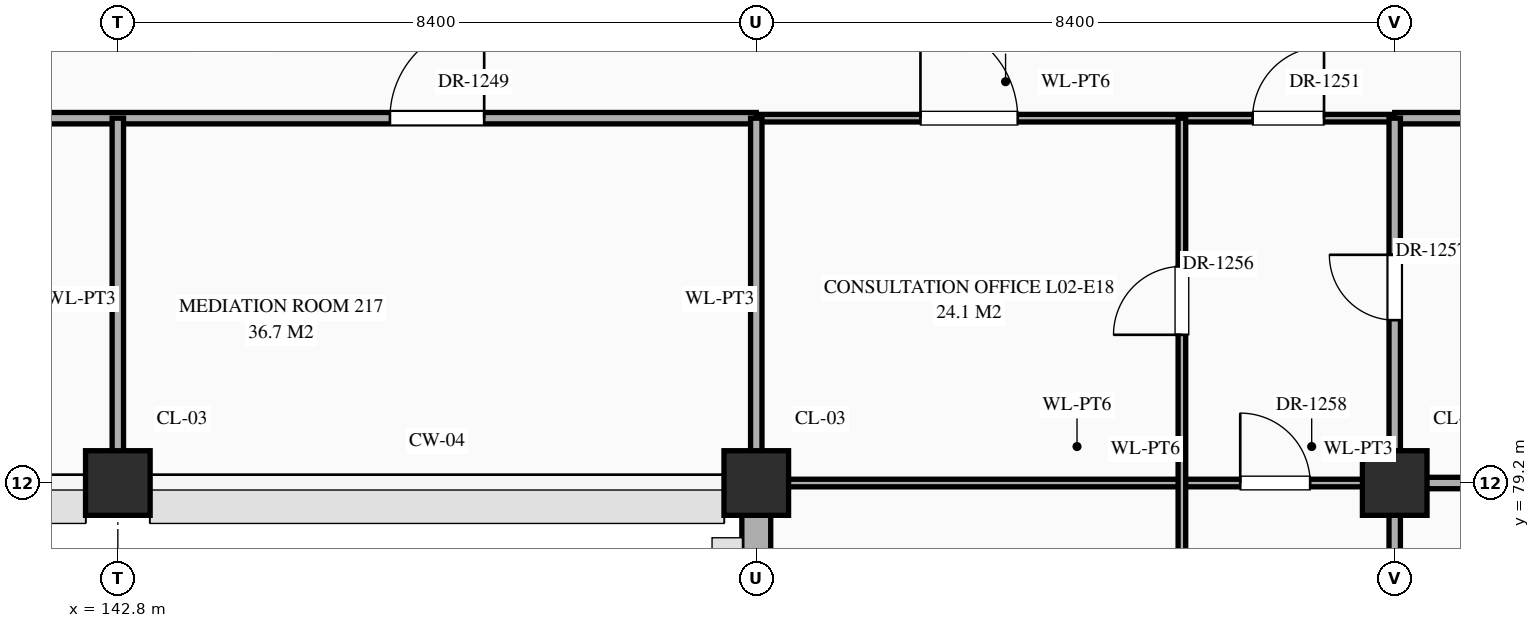
"""IFC4 building model, lengths in metres.
Left out: names, types, materials, properties, quantities, classifications, styles, units other than length and angle.
Written with IfcOpenShell. Run it as: python <this file> out.ifc"""

import sys

from ifc_helpers import new_model, si_unit, direction, frame, frame_2d, origin, origin_2d, place, context, subcontext, project, spatial, rectangle, extrude, element, fill, save


model = new_model("IFC4")
c1 = context("Model", 3, precision=1e-05, world=origin(), true_north=direction((0.0, 1.0)))
c2 = subcontext(c1, "Body", "Model", "MODEL_VIEW")
j1 = project(units=[si_unit("LENGTHUNIT", "METRE"), si_unit("PLANEANGLEUNIT", "RADIAN")], contexts=[c1])
p1 = place(None, origin())
s1 = spatial("IfcSite", under=j1, at=p1, CompositionType="ELEMENT")
p2 = place(p1, origin())
s2 = spatial("IfcBuilding", under=s1, at=p2, CompositionType="ELEMENT")
p3 = place(p2, frame((0.0, 0.0, 5.4)))
s3 = spatial("IfcBuildingStorey", under=s2, at=p3, CompositionType="ELEMENT", Elevation=5.4)
for number, where, z_axis, x_axis in (
    (1, (142.8, 79.2, 0.0), (0.0, 0.0, 1.0), (1.0, 0.0, 0.0)),
    (2, (151.2, 79.2, 0.0), (0.0, 0.0, 1.0), (1.0, 0.0, 0.0)),
    (3, (159.6, 79.2, 0.0), (0.0, 0.0, 1.0), (1.0, 0.0, 0.0)),
):
    element("IfcColumn", number, at=place(p3, frame(where, z_axis=z_axis, x_axis=x_axis)), inside=s3, PredefinedType="COLUMN", context=c2, shape_type="SweptSolid", body=[
        extrude(rectangle(XDim=0.85, YDim=0.85, at=origin_2d()), origin(), (0.0, 0.0, 1.0), 5.4),
    ])
p4 = place(p3, frame((151.2, 72.42, 0.0), z_axis=(0.0, 0.0, 1.0), x_axis=(0.0, 1.0, 0.0)))
e4 = element("IfcWall", 4, at=p4, inside=s3, PredefinedType="STANDARD", context=c2, shape_type="SweptSolid", body=[
    extrude(rectangle(XDim=6.36, YDim=0.38, at=frame_2d((3.18, 0.0))), origin(), (0.0, 0.0, 1.0), 4.47),
])
p5 = place(p4, frame((2.73, 0.0, 0.85)))
e5 = element("IfcOpeningElement", 5, at=p5, cuts=e4, PredefinedType="OPENING", context=c2, shape_type="SweptSolid", body=[
    extrude(rectangle(XDim=0.9, YDim=1.2, at=frame_2d((0.45, 0.6))), frame((0.0, 0.202, 0.0), z_axis=(0.0, -1.0, 0.0), x_axis=(1.0, 0.0, 0.0)), (0.0, 0.0, 1.0), 0.404),
])
p6 = place(p3, frame((151.24, 79.2, 0.0), z_axis=(0.0, 0.0, 1.0), x_axis=(1.0, 0.0, 0.0)))
e6 = element("IfcWall", 6, at=p6, inside=s3, PredefinedType="STANDARD", context=c2, shape_type="SweptSolid", body=[
    extrude(rectangle(XDim=8.36, YDim=0.1, at=frame_2d((4.18, 0.0))), origin(), (0.0, 0.0, 1.0), 4.27),
])
p7 = place(p6, frame((6.327, 0.0, 0.0)))
e7 = element("IfcOpeningElement", 7, at=p7, cuts=e6, PredefinedType="OPENING", context=c2, shape_type="SweptSolid", body=[
    extrude(rectangle(XDim=0.92, YDim=2.15, at=frame_2d((0.46, 1.075))), frame((0.0, 0.062, 0.0), z_axis=(0.0, -1.0, 0.0), x_axis=(1.0, 0.0, 0.0)), (0.0, 0.0, 1.0), 0.124),
])
p8 = place(p3, frame((159.6, 79.2, 0.0), z_axis=(0.0, 0.0, 1.0), x_axis=(1.0, 0.0, 0.0)))
e8 = element("IfcWall", 8, at=p8, inside=s3, PredefinedType="STANDARD", context=c2, shape_type="SweptSolid", body=[
    extrude(rectangle(XDim=8.36, YDim=0.15, at=frame_2d((4.18, 0.0))), origin(), (0.0, 0.0, 1.0), 4.27),
])
p9 = place(p3, frame((16.8, 84.0, 0.0), z_axis=(0.0, 0.0, 1.0), x_axis=(1.0, 0.0, 0.0)))
e9 = element("IfcWall", 9, at=p9, inside=s3, PredefinedType="STANDARD", context=c2, shape_type="SweptSolid", body=[
    extrude(rectangle(XDim=134.4, YDim=0.15, at=frame_2d((67.2, 0.0))), origin(), (0.0, 0.0, 1.0), 5.12),
])
p10 = place(p9, frame((3.58, 0.0, 0.0)))
e10 = element("IfcOpeningElement", 10, at=p10, cuts=e9, PredefinedType="OPENING", context=c2, shape_type="SweptSolid", body=[
    extrude(rectangle(XDim=1.24, YDim=2.3, at=frame_2d((0.62, 1.15))), frame((0.0, 0.087, 0.0), z_axis=(0.0, -1.0, 0.0), x_axis=(1.0, 0.0, 0.0)), (0.0, 0.0, 1.0), 0.174),
])
p11 = place(p9, frame((11.96, 0.0, 0.0)))
e11 = element("IfcOpeningElement", 11, at=p11, cuts=e9, PredefinedType="OPENING", context=c2, shape_type="SweptSolid", body=[
    extrude(rectangle(XDim=1.28, YDim=2.35, at=frame_2d((0.64, 1.175))), frame((0.0, 0.087, 0.0), z_axis=(0.0, -1.0, 0.0), x_axis=(1.0, 0.0, 0.0)), (0.0, 0.0, 1.0), 0.174),
])
p12 = place(p9, frame((20.53, 0.0, 0.0)))
e12 = element("IfcOpeningElement", 12, at=p12, cuts=e9, PredefinedType="OPENING", context=c2, shape_type="SweptSolid", body=[
    extrude(rectangle(XDim=0.94, YDim=2.3, at=frame_2d((0.47, 1.15))), frame((0.0, 0.087, 0.0), z_axis=(0.0, -1.0, 0.0), x_axis=(1.0, 0.0, 0.0)), (0.0, 0.0, 1.0), 0.174),
])
p13 = place(p9, frame((28.91, 0.0, 0.0)))
e13 = element("IfcOpeningElement", 13, at=p13, cuts=e9, PredefinedType="OPENING", context=c2, shape_type="SweptSolid", body=[
    extrude(rectangle(XDim=0.98, YDim=2.35, at=frame_2d((0.49, 1.175))), frame((0.0, 0.087, 0.0), z_axis=(0.0, -1.0, 0.0), x_axis=(1.0, 0.0, 0.0)), (0.0, 0.0, 1.0), 0.174),
])
p14 = place(p9, frame((37.27, 0.0, 0.0)))
e14 = element("IfcOpeningElement", 14, at=p14, cuts=e9, PredefinedType="OPENING", context=c2, shape_type="SweptSolid", body=[
    extrude(rectangle(XDim=1.06, YDim=2.4, at=frame_2d((0.53, 1.2))), frame((0.0, 0.087, 0.0), z_axis=(0.0, -1.0, 0.0), x_axis=(1.0, 0.0, 0.0)), (0.0, 0.0, 1.0), 0.174),
])
p15 = place(p9, frame((45.63, 0.0, 0.0)))
e15 = element("IfcOpeningElement", 15, at=p15, cuts=e9, PredefinedType="OPENING", context=c2, shape_type="SweptSolid", body=[
    extrude(rectangle(XDim=1.14, YDim=2.4, at=frame_2d((0.57, 1.2))), frame((0.0, 0.087, 0.0), z_axis=(0.0, -1.0, 0.0), x_axis=(1.0, 0.0, 0.0)), (0.0, 0.0, 1.0), 0.174),
])
p16 = place(p9, frame((54.15, 0.0, 0.0)))
e16 = element("IfcOpeningElement", 16, at=p16, cuts=e9, PredefinedType="OPENING", context=c2, shape_type="SweptSolid", body=[
    extrude(rectangle(XDim=0.9, YDim=2.15, at=frame_2d((0.45, 1.075))), frame((0.0, 0.087, 0.0), z_axis=(0.0, -1.0, 0.0), x_axis=(1.0, 0.0, 0.0)), (0.0, 0.0, 1.0), 0.174),
])
p17 = place(p9, frame((62.57, 0.0, 0.0)))
e17 = element("IfcOpeningElement", 17, at=p17, cuts=e9, PredefinedType="OPENING", context=c2, shape_type="SweptSolid", body=[
    extrude(rectangle(XDim=0.86, YDim=2.1, at=frame_2d((0.43, 1.05))), frame((0.0, 0.087, 0.0), z_axis=(0.0, -1.0, 0.0), x_axis=(1.0, 0.0, 0.0)), (0.0, 0.0, 1.0), 0.174),
])
p18 = place(p9, frame((70.92, 0.0, 0.0)))
e18 = element("IfcOpeningElement", 18, at=p18, cuts=e9, PredefinedType="OPENING", context=c2, shape_type="SweptSolid", body=[
    extrude(rectangle(XDim=0.96, YDim=2.2, at=frame_2d((0.48, 1.1))), frame((0.0, 0.087, 0.0), z_axis=(0.0, -1.0, 0.0), x_axis=(1.0, 0.0, 0.0)), (0.0, 0.0, 1.0), 0.174),
])
p19 = place(p9, frame((79.3, 0.0, 0.0)))
e19 = element("IfcOpeningElement", 19, at=p19, cuts=e9, PredefinedType="OPENING", context=c2, shape_type="SweptSolid", body=[
    extrude(rectangle(XDim=1.0, YDim=2.25, at=frame_2d((0.5, 1.125))), frame((0.0, 0.087, 0.0), z_axis=(0.0, -1.0, 0.0), x_axis=(1.0, 0.0, 0.0)), (0.0, 0.0, 1.0), 0.174),
])
p20 = place(p9, frame((87.68, 0.0, 0.0)))
e20 = element("IfcOpeningElement", 20, at=p20, cuts=e9, PredefinedType="OPENING", context=c2, shape_type="SweptSolid", body=[
    extrude(rectangle(XDim=1.04, YDim=2.2, at=frame_2d((0.52, 1.1))), frame((0.0, 0.087, 0.0), z_axis=(0.0, -1.0, 0.0), x_axis=(1.0, 0.0, 0.0)), (0.0, 0.0, 1.0), 0.174),
])
p21 = place(p9, frame((96.06, 0.0, 0.0)))
e21 = element("IfcOpeningElement", 21, at=p21, cuts=e9, PredefinedType="OPENING", context=c2, shape_type="SweptSolid", body=[
    extrude(rectangle(XDim=1.08, YDim=2.25, at=frame_2d((0.54, 1.125))), frame((0.0, 0.087, 0.0), z_axis=(0.0, -1.0, 0.0), x_axis=(1.0, 0.0, 0.0)), (0.0, 0.0, 1.0), 0.174),
])
p22 = place(p9, frame((104.44, 0.0, 0.0)))
e22 = element("IfcOpeningElement", 22, at=p22, cuts=e9, PredefinedType="OPENING", context=c2, shape_type="SweptSolid", body=[
    extrude(rectangle(XDim=1.12, YDim=2.25, at=frame_2d((0.56, 1.125))), frame((0.0, 0.087, 0.0), z_axis=(0.0, -1.0, 0.0), x_axis=(1.0, 0.0, 0.0)), (0.0, 0.0, 1.0), 0.174),
])
p23 = place(p9, frame((112.82, 0.0, 0.0)))
e23 = element("IfcOpeningElement", 23, at=p23, cuts=e9, PredefinedType="OPENING", context=c2, shape_type="SweptSolid", body=[
    extrude(rectangle(XDim=1.16, YDim=2.3, at=frame_2d((0.58, 1.15))), frame((0.0, 0.087, 0.0), z_axis=(0.0, -1.0, 0.0), x_axis=(1.0, 0.0, 0.0)), (0.0, 0.0, 1.0), 0.174),
])
p24 = place(p9, frame((121.2, 0.0, 0.0)))
e24 = element("IfcOpeningElement", 24, at=p24, cuts=e9, PredefinedType="OPENING", context=c2, shape_type="SweptSolid", body=[
    extrude(rectangle(XDim=1.2, YDim=2.35, at=frame_2d((0.6, 1.175))), frame((0.0, 0.087, 0.0), z_axis=(0.0, -1.0, 0.0), x_axis=(1.0, 0.0, 0.0)), (0.0, 0.0, 1.0), 0.174),
])
p25 = place(p9, frame((129.58, 0.0, 0.0)))
e25 = element("IfcOpeningElement", 25, at=p25, cuts=e9, PredefinedType="OPENING", context=c2, shape_type="SweptSolid", body=[
    extrude(rectangle(XDim=1.24, YDim=2.3, at=frame_2d((0.62, 1.15))), frame((0.0, 0.087, 0.0), z_axis=(0.0, -1.0, 0.0), x_axis=(1.0, 0.0, 0.0)), (0.0, 0.0, 1.0), 0.174),
])
p26 = place(p3, frame((151.2, 84.0, 0.0), z_axis=(0.0, 0.0, 1.0), x_axis=(1.0, 0.0, 0.0)))
e26 = element("IfcWall", 26, at=p26, inside=s3, PredefinedType="STANDARD", context=c2, shape_type="SweptSolid", body=[
    extrude(rectangle(XDim=8.4, YDim=0.1, at=frame_2d((4.2, 0.0))), origin(), (0.0, 0.0, 1.0), 5.12),
])
p27 = place(p26, frame((2.16, 0.0, 0.0)))
e27 = element("IfcOpeningElement", 27, at=p27, cuts=e26, PredefinedType="OPENING", context=c2, shape_type="SweptSolid", body=[
    extrude(rectangle(XDim=1.28, YDim=2.35, at=frame_2d((0.64, 1.175))), frame((0.0, 0.062, 0.0), z_axis=(0.0, -1.0, 0.0), x_axis=(1.0, 0.0, 0.0)), (0.0, 0.0, 1.0), 0.124),
])
p28 = place(p26, frame((6.53, 0.0, 0.0)))
e28 = element("IfcOpeningElement", 28, at=p28, cuts=e26, PredefinedType="OPENING", context=c2, shape_type="SweptSolid", body=[
    extrude(rectangle(XDim=0.94, YDim=2.3, at=frame_2d((0.47, 1.15))), frame((0.0, 0.062, 0.0), z_axis=(0.0, -1.0, 0.0), x_axis=(1.0, 0.0, 0.0)), (0.0, 0.0, 1.0), 0.124),
])
p29 = place(p3, frame((159.6, 84.0, 0.0), z_axis=(0.0, 0.0, 1.0), x_axis=(1.0, 0.0, 0.0)))
e29 = element("IfcWall", 29, at=p29, inside=s3, PredefinedType="STANDARD", context=c2, shape_type="SweptSolid", body=[
    extrude(rectangle(XDim=8.36, YDim=0.15, at=frame_2d((4.18, 0.0))), origin(), (0.0, 0.0, 1.0), 5.12),
])
p30 = place(p29, frame((3.69, 0.0, 0.0)))
e30 = element("IfcOpeningElement", 30, at=p30, cuts=e29, PredefinedType="OPENING", context=c2, shape_type="SweptSolid", body=[
    extrude(rectangle(XDim=0.98, YDim=2.35, at=frame_2d((0.49, 1.175))), frame((0.0, 0.087, 0.0), z_axis=(0.0, -1.0, 0.0), x_axis=(1.0, 0.0, 0.0)), (0.0, 0.0, 1.0), 0.174),
])
for number, where, z_axis, x_axis in (
    (31, (142.8, 79.24, 0.0), (0.0, 0.0, 1.0), (0.0, 1.0, 0.0)),
    (32, (151.2, 79.24, 0.0), (0.0, 0.0, 1.0), (0.0, 1.0, 0.0)),
):
    element("IfcWall", number, at=place(p3, frame(where, z_axis=z_axis, x_axis=x_axis)), inside=s3, PredefinedType="STANDARD", context=c2, shape_type="SweptSolid", body=[
        extrude(rectangle(XDim=4.76, YDim=0.15, at=frame_2d((2.38, 0.0))), origin(), (0.0, 0.0, 1.0), 4.37),
    ])
p31 = place(p3, frame((156.8, 43.2, 0.0), z_axis=(0.0, 0.0, 1.0), x_axis=(0.0, 1.0, 0.0)))
e33 = element("IfcWall", 33, at=p31, inside=s3, PredefinedType="STANDARD", context=c2, shape_type="SweptSolid", body=[
    extrude(rectangle(XDim=40.8, YDim=0.1, at=frame_2d((20.4, 0.0))), origin(), (0.0, 0.0, 1.0), 5.12),
])
p32 = place(p31, frame((37.95, 0.0, 0.0)))
e34 = element("IfcOpeningElement", 34, at=p32, cuts=e33, PredefinedType="OPENING", context=c2, shape_type="SweptSolid", body=[
    extrude(rectangle(XDim=0.9, YDim=2.15, at=frame_2d((0.45, 1.075))), frame((0.0, 0.062, 0.0), z_axis=(0.0, -1.0, 0.0), x_axis=(1.0, 0.0, 0.0)), (0.0, 0.0, 1.0), 0.124),
])
p33 = place(p31, frame((3.0, 0.0, 0.0)))
e35 = element("IfcOpeningElement", 35, at=p33, cuts=e33, PredefinedType="OPENING", context=c2, shape_type="SweptSolid", body=[
    extrude(rectangle(XDim=1.2, YDim=2.35, at=frame_2d((0.6, 1.175))), frame((0.0, 0.062, 0.0), z_axis=(0.0, -1.0, 0.0), x_axis=(1.0, 0.0, 0.0)), (0.0, 0.0, 1.0), 0.124),
])
p34 = place(p31, frame((10.18, 0.0, 0.0)))
e36 = element("IfcOpeningElement", 36, at=p34, cuts=e33, PredefinedType="OPENING", context=c2, shape_type="SweptSolid", body=[
    extrude(rectangle(XDim=1.24, YDim=2.3, at=frame_2d((0.62, 1.15))), frame((0.0, 0.062, 0.0), z_axis=(0.0, -1.0, 0.0), x_axis=(1.0, 0.0, 0.0)), (0.0, 0.0, 1.0), 0.124),
])
p35 = place(p31, frame((17.36, 0.0, 0.0)))
e37 = element("IfcOpeningElement", 37, at=p35, cuts=e33, PredefinedType="OPENING", context=c2, shape_type="SweptSolid", body=[
    extrude(rectangle(XDim=1.28, YDim=2.35, at=frame_2d((0.64, 1.175))), frame((0.0, 0.062, 0.0), z_axis=(0.0, -1.0, 0.0), x_axis=(1.0, 0.0, 0.0)), (0.0, 0.0, 1.0), 0.124),
])
p36 = place(p31, frame((24.73, 0.0, 0.0)))
e38 = element("IfcOpeningElement", 38, at=p36, cuts=e33, PredefinedType="OPENING", context=c2, shape_type="SweptSolid", body=[
    extrude(rectangle(XDim=0.94, YDim=2.3, at=frame_2d((0.47, 1.15))), frame((0.0, 0.062, 0.0), z_axis=(0.0, -1.0, 0.0), x_axis=(1.0, 0.0, 0.0)), (0.0, 0.0, 1.0), 0.124),
])
p37 = place(p31, frame((31.91, 0.0, 0.0)))
e39 = element("IfcOpeningElement", 39, at=p37, cuts=e33, PredefinedType="OPENING", context=c2, shape_type="SweptSolid", body=[
    extrude(rectangle(XDim=0.98, YDim=2.35, at=frame_2d((0.49, 1.175))), frame((0.0, 0.062, 0.0), z_axis=(0.0, -1.0, 0.0), x_axis=(1.0, 0.0, 0.0)), (0.0, 0.0, 1.0), 0.124),
])
p38 = place(p3, frame((159.6, 50.4, 0.0), z_axis=(0.0, 0.0, 1.0), x_axis=(0.0, 1.0, 0.0)))
e40 = element("IfcWall", 40, at=p38, inside=s3, PredefinedType="STANDARD", context=c2, shape_type="SweptSolid", body=[
    extrude(rectangle(XDim=33.6, YDim=0.15, at=frame_2d((16.8, 0.0))), origin(), (0.0, 0.0, 1.0), 4.37),
])
p39 = place(p38, frame((30.942, 0.0, 0.0)))
e41 = element("IfcOpeningElement", 41, at=p39, cuts=e40, PredefinedType="OPENING", context=c2, shape_type="SweptSolid", body=[
    extrude(rectangle(XDim=0.86, YDim=2.1, at=frame_2d((0.43, 1.05))), frame((0.0, 0.087, 0.0), z_axis=(0.0, -1.0, 0.0), x_axis=(1.0, 0.0, 0.0)), (0.0, 0.0, 1.0), 0.174),
])
p40 = place(p38, frame((3.03, 0.0, 0.0)))
e42 = element("IfcOpeningElement", 42, at=p40, cuts=e40, PredefinedType="OPENING", context=c2, shape_type="SweptSolid", body=[
    extrude(rectangle(XDim=1.14, YDim=2.4, at=frame_2d((0.57, 1.2))), frame((0.0, 0.087, 0.0), z_axis=(0.0, -1.0, 0.0), x_axis=(1.0, 0.0, 0.0)), (0.0, 0.0, 1.0), 0.174),
])
p41 = place(p38, frame((10.35, 0.0, 0.0)))
e43 = element("IfcOpeningElement", 43, at=p41, cuts=e40, PredefinedType="OPENING", context=c2, shape_type="SweptSolid", body=[
    extrude(rectangle(XDim=0.9, YDim=2.15, at=frame_2d((0.45, 1.075))), frame((0.0, 0.087, 0.0), z_axis=(0.0, -1.0, 0.0), x_axis=(1.0, 0.0, 0.0)), (0.0, 0.0, 1.0), 0.174),
])
p42 = place(p38, frame((17.57, 0.0, 0.0)))
e44 = element("IfcOpeningElement", 44, at=p42, cuts=e40, PredefinedType="OPENING", context=c2, shape_type="SweptSolid", body=[
    extrude(rectangle(XDim=0.86, YDim=2.1, at=frame_2d((0.43, 1.05))), frame((0.0, 0.087, 0.0), z_axis=(0.0, -1.0, 0.0), x_axis=(1.0, 0.0, 0.0)), (0.0, 0.0, 1.0), 0.174),
])
p43 = place(p38, frame((24.74, 0.0, 0.0)))
e45 = element("IfcOpeningElement", 45, at=p43, cuts=e40, PredefinedType="OPENING", context=c2, shape_type="SweptSolid", body=[
    extrude(rectangle(XDim=0.92, YDim=2.15, at=frame_2d((0.46, 1.075))), frame((0.0, 0.087, 0.0), z_axis=(0.0, -1.0, 0.0), x_axis=(1.0, 0.0, 0.0)), (0.0, 0.0, 1.0), 0.174),
])
p44 = place(p25, origin())
e46 = element("IfcDoor", 46, at=p44, inside=s3, OperationType="SINGLE_SWING_RIGHT", PredefinedType="DOOR", context=c2, shape_type="SweptSolid", body=[
    extrude(rectangle(XDim=1.24, YDim=2.3, at=frame_2d((0.62, 1.15))), frame((0.0, 0.025, 0.0), z_axis=(0.0, -1.0, 0.0), x_axis=(1.0, 0.0, 0.0)), (0.0, 0.0, 1.0), 0.05),
])
fill(e25, e46)
p45 = place(p27, origin())
e47 = element("IfcDoor", 47, at=p45, inside=s3, OperationType="SINGLE_SWING_LEFT", PredefinedType="DOOR", context=c2, shape_type="SweptSolid", body=[
    extrude(rectangle(XDim=1.28, YDim=2.35, at=frame_2d((0.64, 1.175))), frame((0.0, 0.025, 0.0), z_axis=(0.0, -1.0, 0.0), x_axis=(1.0, 0.0, 0.0)), (0.0, 0.0, 1.0), 0.05),
])
fill(e27, e47)
p46 = place(p28, origin())
e48 = element("IfcDoor", 48, at=p46, inside=s3, OperationType="SINGLE_SWING_RIGHT", PredefinedType="DOOR", context=c2, shape_type="SweptSolid", body=[
    extrude(rectangle(XDim=0.94, YDim=2.3, at=frame_2d((0.47, 1.15))), frame((0.0, 0.025, 0.0), z_axis=(0.0, -1.0, 0.0), x_axis=(1.0, 0.0, 0.0)), (0.0, 0.0, 1.0), 0.05),
])
fill(e28, e48)
p47 = place(p32, origin())
e49 = element("IfcDoor", 49, at=p47, inside=s3, OperationType="SINGLE_SWING_LEFT", PredefinedType="DOOR", context=c2, shape_type="SweptSolid", body=[
    extrude(rectangle(XDim=0.9, YDim=2.15, at=frame_2d((0.45, 1.075))), frame((0.0, 0.025, 0.0), z_axis=(0.0, -1.0, 0.0), x_axis=(1.0, 0.0, 0.0)), (0.0, 0.0, 1.0), 0.05),
])
fill(e34, e49)
p48 = place(p39, origin())
e50 = element("IfcDoor", 50, at=p48, inside=s3, OperationType="SINGLE_SWING_RIGHT", PredefinedType="DOOR", context=c2, shape_type="SweptSolid", body=[
    extrude(rectangle(XDim=0.86, YDim=2.1, at=frame_2d((0.43, 1.05))), frame((0.0, 0.025, 0.0), z_axis=(0.0, -1.0, 0.0), x_axis=(1.0, 0.0, 0.0)), (0.0, 0.0, 1.0), 0.05),
])
fill(e41, e50)
p49 = place(p7, origin())
e51 = element("IfcDoor", 51, at=p49, inside=s3, OperationType="SINGLE_SWING_LEFT", PredefinedType="DOOR", context=c2, shape_type="SweptSolid", body=[
    extrude(rectangle(XDim=0.92, YDim=2.15, at=frame_2d((0.46, 1.075))), frame((0.0, 0.025, 0.0), z_axis=(0.0, -1.0, 0.0), x_axis=(1.0, 0.0, 0.0)), (0.0, 0.0, 1.0), 0.05),
])
fill(e7, e51)
save(model, sys.argv[1])
